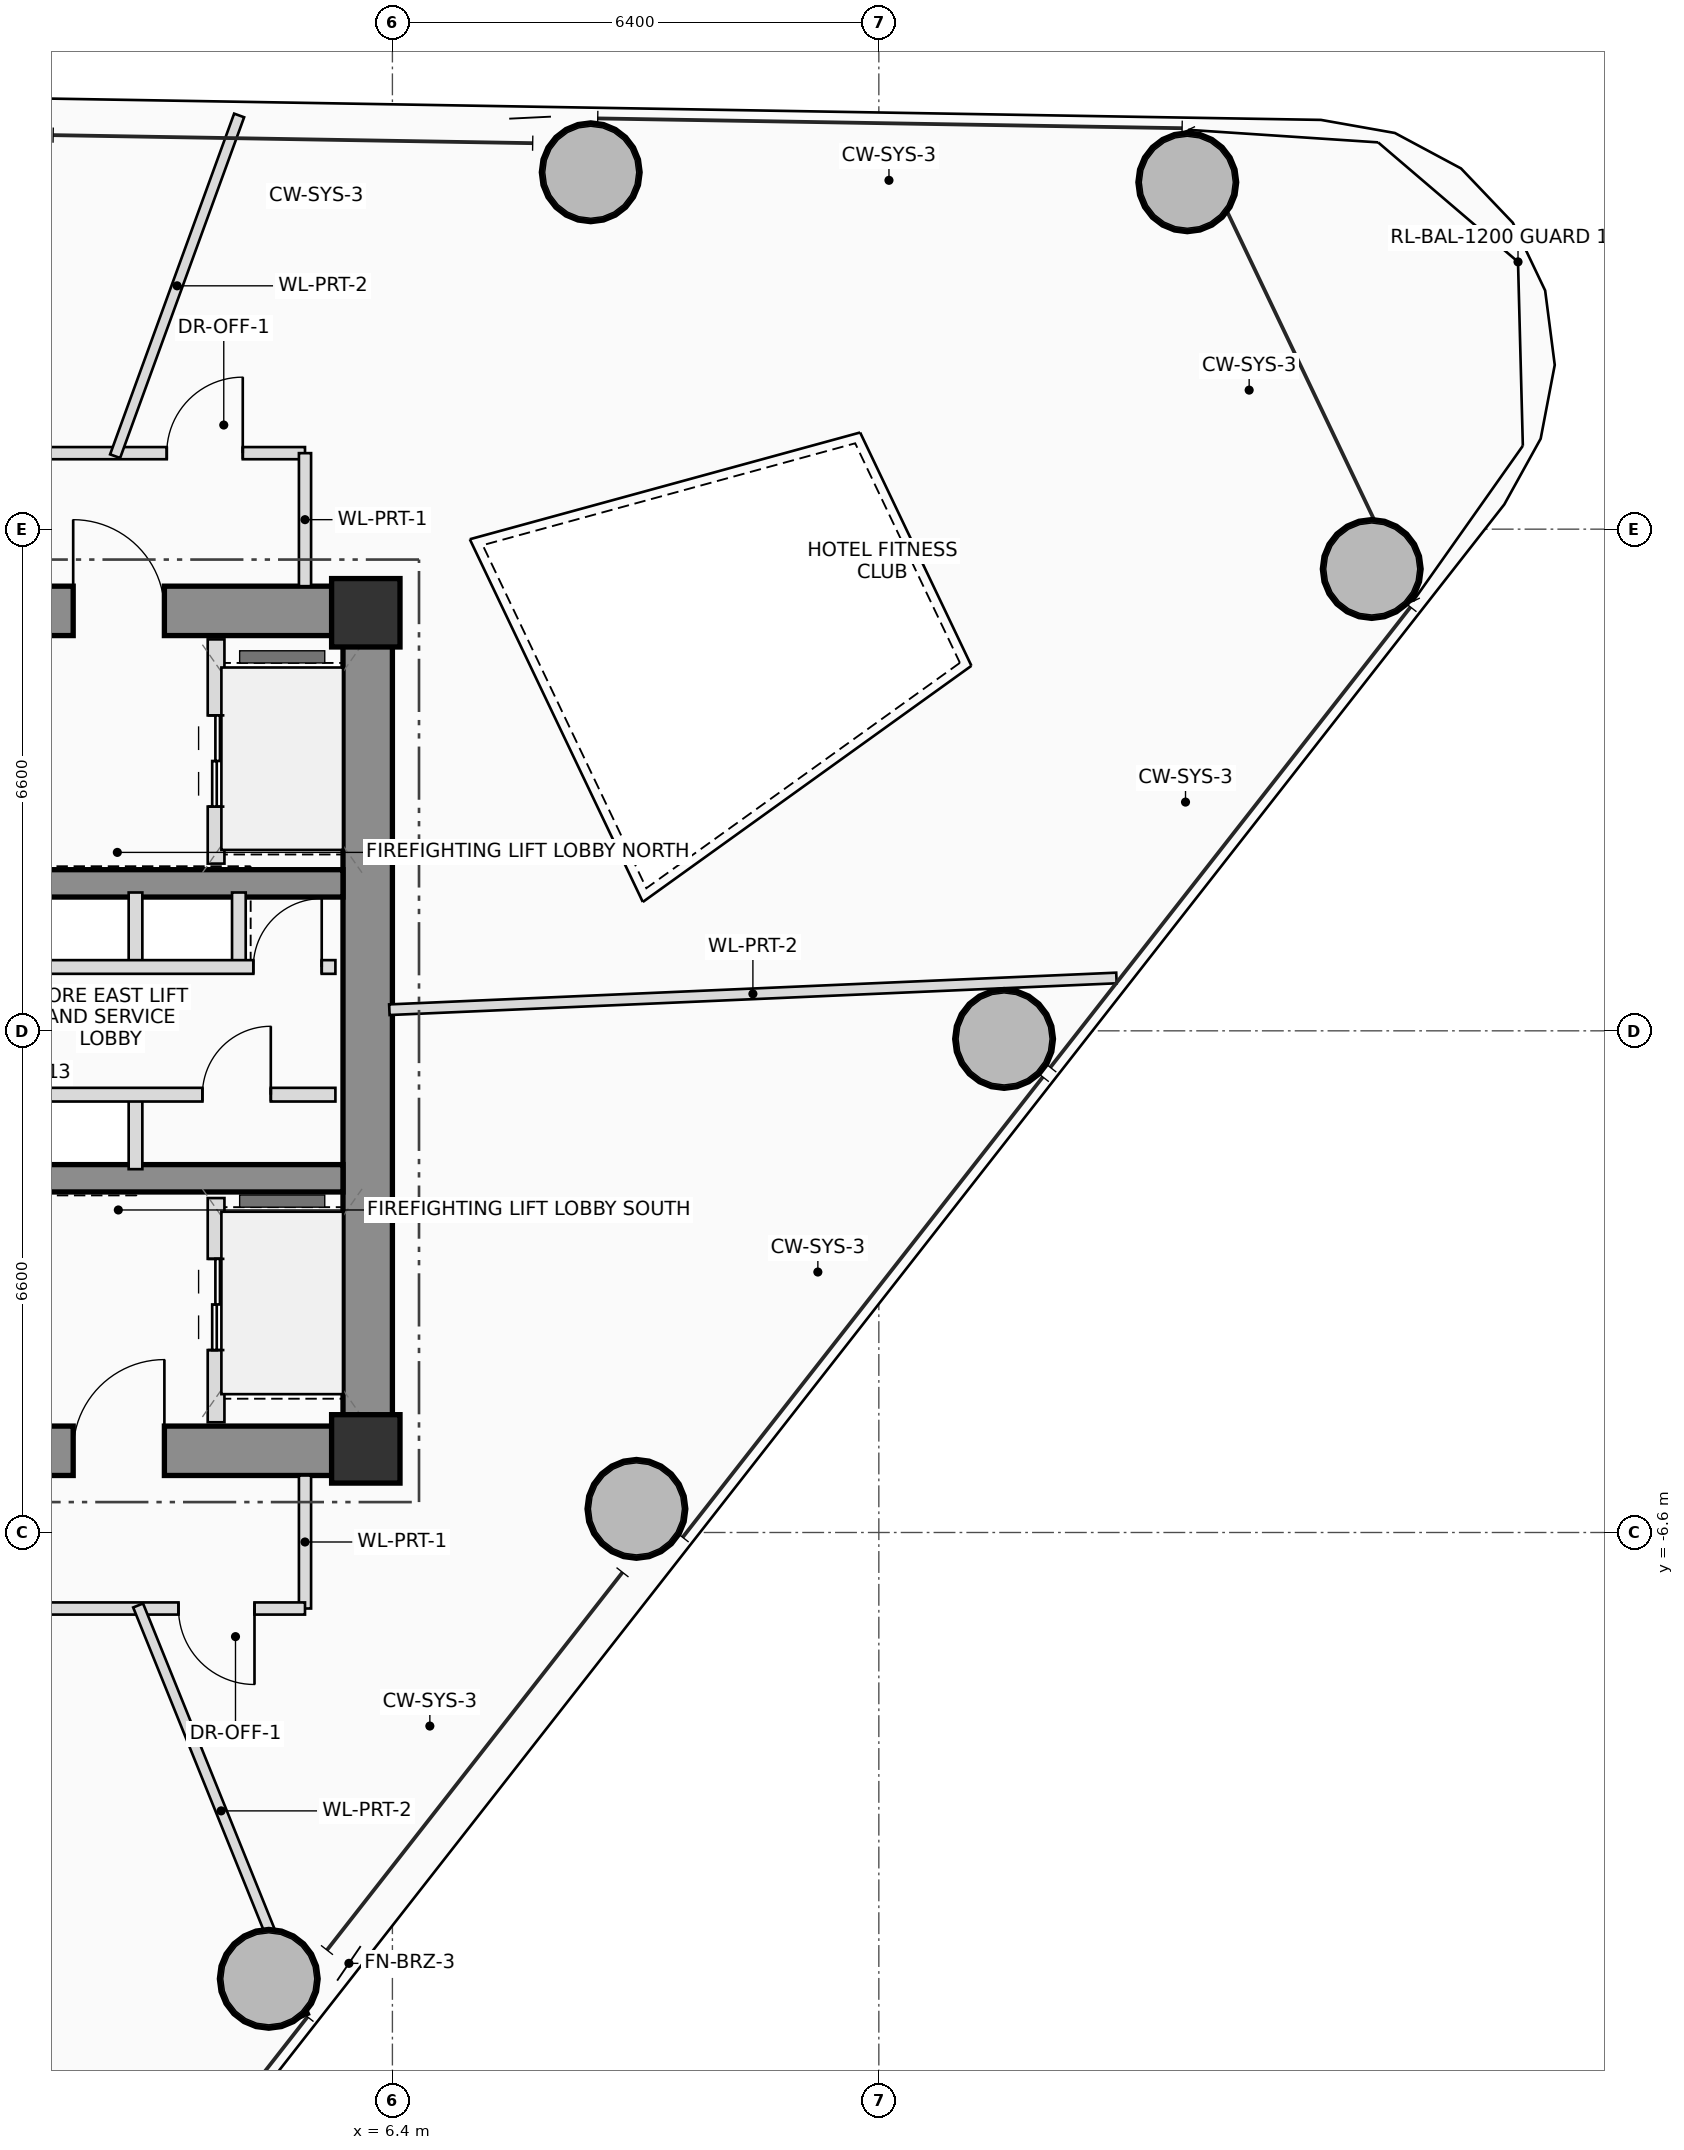
"""IFC4 building model, lengths in metres.
Left out: names, types, materials, properties, quantities, classifications, styles, units other than length and angle.
Written with IfcOpenShell. Run it as: python <this file> out.ifc"""

import sys

from ifc_helpers import new_model, si_unit, direction, frame, frame_2d, origin, origin_2d, place, context, subcontext, project, spatial, rectangle, hollow_circle, extrude, source, transform, mapped, element, fill, save


model = new_model("IFC4")
c1 = context("Model", 3, precision=1e-05, world=origin(), true_north=direction((0.0, 1.0)))
c2 = subcontext(c1, "Body", "Model", "MODEL_VIEW")
j1 = project(units=[si_unit("LENGTHUNIT", "METRE"), si_unit("PLANEANGLEUNIT", "RADIAN")], contexts=[c1])
p1 = place(None, origin())
s1 = spatial("IfcSite", under=j1, at=p1, CompositionType="ELEMENT")
p2 = place(p1, origin())
s2 = spatial("IfcBuilding", under=s1, at=p2, CompositionType="ELEMENT")
p3 = place(p2, frame((0.0, 0.0, 139.85)))
s3 = spatial("IfcBuildingStorey", under=s2, at=p3, CompositionType="ELEMENT", Elevation=139.85)
m1 = source(origin(), c2, "Body", "SweptSolid", [
    extrude(rectangle(XDim=0.9, YDim=0.9, at=origin_2d()), origin(), (0.0, 0.0, 1.0), 3.45),
])
for number, where, z_axis, x_axis in (
    (1, (6.05, -5.5, 0.0), (0.0, 0.0, 1.0), (1.0, 0.0, 0.0)),
    (2, (6.05, 5.5, 0.0), (0.0, 0.0, 1.0), (1.0, 0.0, 0.0)),
):
    element("IfcColumn", number, at=place(p3, frame(where, z_axis=z_axis, x_axis=x_axis)), inside=s3, PredefinedType="COLUMN", context=c2, shape_type="MappedRepresentation", body=[
        mapped(m1, transform((0.0, 0.0, 0.0), scale=1.0)),
    ])
p4 = place(p3, frame((-6.4, 5.525, 0.0), z_axis=(0.0, 0.0, 1.0), x_axis=(1.0, 0.0, 0.0)))
e3 = element("IfcWall", 3, at=p4, inside=s3, PredefinedType="SHEAR", context=c2, shape_type="SweptSolid", body=[
    extrude(rectangle(XDim=12.8, YDim=0.65, at=frame_2d((6.4, 0.0))), origin(), (0.0, 0.0, 1.0), 3.45),
])
p5 = place(p4, frame((8.6, 0.0, 0.0)))
e4 = element("IfcOpeningElement", 4, at=p5, cuts=e3, PredefinedType="OPENING", context=c2, shape_type="SweptSolid", body=[
    extrude(rectangle(XDim=1.2, YDim=2.2, at=frame_2d((0.6, 1.1))), frame((0.0, 0.335, 0.0), z_axis=(0.0, -1.0, 0.0), x_axis=(1.0, 0.0, 0.0)), (0.0, 0.0, 1.0), 0.67),
])
p6 = place(p3, frame((-6.4, -5.525, 0.0), z_axis=(0.0, 0.0, 1.0), x_axis=(1.0, 0.0, 0.0)))
e5 = element("IfcWall", 5, at=p6, inside=s3, PredefinedType="SHEAR", context=c2, shape_type="SweptSolid", body=[
    extrude(rectangle(XDim=12.8, YDim=0.65, at=frame_2d((6.4, 0.0))), origin(), (0.0, 0.0, 1.0), 3.45),
])
p7 = place(p6, frame((8.6, 0.0, 0.0)))
e6 = element("IfcOpeningElement", 6, at=p7, cuts=e5, PredefinedType="OPENING", context=c2, shape_type="SweptSolid", body=[
    extrude(rectangle(XDim=1.2, YDim=2.2, at=frame_2d((0.6, 1.1))), frame((0.0, 0.335, 0.0), z_axis=(0.0, -1.0, 0.0), x_axis=(1.0, 0.0, 0.0)), (0.0, 0.0, 1.0), 0.67),
])
p8 = place(p3, frame((6.075, -5.2, 0.0), z_axis=(0.0, 0.0, 1.0), x_axis=(0.0, 1.0, 0.0)))
e7 = element("IfcWall", 7, at=p8, inside=s3, PredefinedType="SHEAR", context=c2, shape_type="SweptSolid", body=[
    extrude(rectangle(XDim=10.4, YDim=0.65, at=frame_2d((5.2, 0.0))), origin(), (0.0, 0.0, 1.0), 3.45),
])
for number, where, z_axis, x_axis in (
    (8, (-5.75, 1.94, 0.0), (0.0, 0.0, 1.0), (1.0, 0.0, 0.0)),
    (9, (-5.75, -1.94, 0.0), (0.0, 0.0, 1.0), (1.0, 0.0, 0.0)),
):
    element("IfcWall", number, at=place(p3, frame(where, z_axis=z_axis, x_axis=x_axis)), inside=s3, PredefinedType="SHEAR", context=c2, shape_type="SweptSolid", body=[
        extrude(rectangle(XDim=11.5, YDim=0.36, at=frame_2d((5.75, 0.0))), origin(), (0.0, 0.0, 1.0), 3.45),
    ])
m2 = source(origin(), c2, "Body", "SweptSolid", [
    extrude(hollow_circle(Radius=0.65, WallThickness=0.045, at=origin_2d()), origin(), (0.0, 0.0, 1.0), 3.45),
])
for number, where, z_axis, x_axis in (
    (10, (4.773, -12.472, 0.0), (0.0, 0.0, 1.0), (1.0, 0.0, 0.0)),
    (11, (9.611, -6.289, 0.0), (0.0, 0.0, 1.0), (1.0, 0.0, 0.0)),
    (12, (14.448, -0.107, 0.0), (0.0, 0.0, 1.0), (1.0, 0.0, 0.0)),
    (13, (19.285, 6.076, 0.0), (0.0, 0.0, 1.0), (1.0, 0.0, 0.0)),
    (14, (16.858, 11.164, 0.0), (0.0, 0.0, 1.0), (1.0, 0.0, 0.0)),
    (15, (9.01, 11.295, 0.0), (0.0, 0.0, 1.0), (1.0, 0.0, 0.0)),
):
    element("IfcColumn", number, at=place(p3, frame(where, z_axis=z_axis, x_axis=x_axis)), inside=s3, PredefinedType="COLUMN", context=c2, shape_type="MappedRepresentation", body=[
        mapped(m2, transform((0.0, 0.0, 0.0), scale=1.0)),
    ])
p9 = place(p3, frame((4.08, 2.2, 0.0), z_axis=(0.0, 0.0, 1.0), x_axis=(0.0, 1.0, 0.0)))
e16 = element("IfcWall", 16, at=p9, inside=s3, PredefinedType="PLUMBINGWALL", context=c2, shape_type="SweptSolid", body=[
    extrude(rectangle(XDim=2.95, YDim=0.22, at=frame_2d((1.475, 0.0))), origin(), (0.0, 0.0, 1.0), 3.25),
])
p10 = place(p9, frame((0.75, 0.0, 0.0)))
e17 = element("IfcOpeningElement", 17, at=p10, cuts=e16, PredefinedType="OPENING", context=c2, shape_type="SweptSolid", body=[
    extrude(rectangle(XDim=1.2, YDim=2.25, at=frame_2d((0.6, 1.125))), frame((0.0, 0.12, 0.0), z_axis=(0.0, -1.0, 0.0), x_axis=(1.0, 0.0, 0.0)), (0.0, 0.0, 1.0), 0.24),
])
p11 = place(p3, frame((4.08, -5.15, 0.0), z_axis=(0.0, 0.0, 1.0), x_axis=(0.0, 1.0, 0.0)))
e18 = element("IfcWall", 18, at=p11, inside=s3, PredefinedType="PLUMBINGWALL", context=c2, shape_type="SweptSolid", body=[
    extrude(rectangle(XDim=2.95, YDim=0.22, at=frame_2d((1.475, 0.0))), origin(), (0.0, 0.0, 1.0), 3.25),
])
p12 = place(p11, frame((0.95, 0.0, 0.0)))
e19 = element("IfcOpeningElement", 19, at=p12, cuts=e18, PredefinedType="OPENING", context=c2, shape_type="SweptSolid", body=[
    extrude(rectangle(XDim=1.2, YDim=2.25, at=frame_2d((0.6, 1.125))), frame((0.0, 0.12, 0.0), z_axis=(0.0, -1.0, 0.0), x_axis=(1.0, 0.0, 0.0)), (0.0, 0.0, 1.0), 0.24),
])
for number, where, z_axis, x_axis in (
    (20, (3.02, 0.84, 0.0), (0.0, 0.0, 1.0), (0.0, 1.0, 0.0)),
    (21, (4.38, 0.84, 0.0), (0.0, 0.0, 1.0), (0.0, 1.0, 0.0)),
    (22, (3.02, -1.82, 0.0), (0.0, 0.0, 1.0), (0.0, 1.0, 0.0)),
):
    element("IfcWall", number, at=place(p3, frame(where, z_axis=z_axis, x_axis=x_axis)), inside=s3, PredefinedType="PLUMBINGWALL", context=c2, shape_type="SweptSolid", body=[
        extrude(rectangle(XDim=0.98, YDim=0.18, at=frame_2d((0.49, 0.0))), origin(), (0.0, 0.0, 1.0), 3.25),
    ])
p13 = place(p3, frame((-5.68, 0.84, 0.0), z_axis=(0.0, 0.0, 1.0), x_axis=(1.0, 0.0, 0.0)))
e23 = element("IfcWall", 23, at=p13, inside=s3, PredefinedType="PLUMBINGWALL", context=c2, shape_type="SweptSolid", body=[
    extrude(rectangle(XDim=11.33, YDim=0.18, at=frame_2d((5.665, 0.0))), origin(), (0.0, 0.0, 1.0), 3.25),
])
p14 = place(p13, frame((1.03, 0.0, 0.0)))
e24 = element("IfcOpeningElement", 24, at=p14, cuts=e23, PredefinedType="OPENING", context=c2, shape_type="SweptSolid", body=[
    extrude(rectangle(XDim=0.9, YDim=2.05, at=frame_2d((0.45, 1.025))), frame((0.0, 0.1, 0.0), z_axis=(0.0, -1.0, 0.0), x_axis=(1.0, 0.0, 0.0)), (0.0, 0.0, 1.0), 0.2),
])
p15 = place(p13, frame((3.93, 0.0, 0.0)))
e25 = element("IfcOpeningElement", 25, at=p15, cuts=e23, PredefinedType="OPENING", context=c2, shape_type="SweptSolid", body=[
    extrude(rectangle(XDim=1.1, YDim=2.2, at=frame_2d((0.55, 1.1))), frame((0.0, 0.1, 0.0), z_axis=(0.0, -1.0, 0.0), x_axis=(1.0, 0.0, 0.0)), (0.0, 0.0, 1.0), 0.2),
])
p16 = place(p13, frame((5.63, 0.0, 0.0)))
e26 = element("IfcOpeningElement", 26, at=p16, cuts=e23, PredefinedType="OPENING", context=c2, shape_type="SweptSolid", body=[
    extrude(rectangle(XDim=1.1, YDim=2.2, at=frame_2d((0.55, 1.1))), frame((0.0, 0.1, 0.0), z_axis=(0.0, -1.0, 0.0), x_axis=(1.0, 0.0, 0.0)), (0.0, 0.0, 1.0), 0.2),
])
p17 = place(p13, frame((10.25, 0.0, 0.0)))
e27 = element("IfcOpeningElement", 27, at=p17, cuts=e23, PredefinedType="OPENING", context=c2, shape_type="SweptSolid", body=[
    extrude(rectangle(XDim=0.9, YDim=2.05, at=frame_2d((0.45, 1.025))), frame((0.0, 0.1, 0.0), z_axis=(0.0, -1.0, 0.0), x_axis=(1.0, 0.0, 0.0)), (0.0, 0.0, 1.0), 0.2),
])
p18 = place(p3, frame((-5.68, -0.84, 0.0), z_axis=(0.0, 0.0, 1.0), x_axis=(1.0, 0.0, 0.0)))
e28 = element("IfcWall", 28, at=p18, inside=s3, PredefinedType="PLUMBINGWALL", context=c2, shape_type="SweptSolid", body=[
    extrude(rectangle(XDim=11.33, YDim=0.18, at=frame_2d((5.665, 0.0))), origin(), (0.0, 0.0, 1.0), 3.25),
])
p19 = place(p18, frame((1.73, 0.0, 0.0)))
e29 = element("IfcOpeningElement", 29, at=p19, cuts=e28, PredefinedType="OPENING", context=c2, shape_type="SweptSolid", body=[
    extrude(rectangle(XDim=0.9, YDim=2.05, at=frame_2d((0.45, 1.025))), frame((0.0, 0.1, 0.0), z_axis=(0.0, -1.0, 0.0), x_axis=(1.0, 0.0, 0.0)), (0.0, 0.0, 1.0), 0.2),
])
p20 = place(p18, frame((3.93, 0.0, 0.0)))
e30 = element("IfcOpeningElement", 30, at=p20, cuts=e28, PredefinedType="OPENING", context=c2, shape_type="SweptSolid", body=[
    extrude(rectangle(XDim=1.1, YDim=2.2, at=frame_2d((0.55, 1.1))), frame((0.0, 0.1, 0.0), z_axis=(0.0, -1.0, 0.0), x_axis=(1.0, 0.0, 0.0)), (0.0, 0.0, 1.0), 0.2),
])
p21 = place(p18, frame((5.63, 0.0, 0.0)))
e31 = element("IfcOpeningElement", 31, at=p21, cuts=e28, PredefinedType="OPENING", context=c2, shape_type="SweptSolid", body=[
    extrude(rectangle(XDim=1.1, YDim=2.2, at=frame_2d((0.55, 1.1))), frame((0.0, 0.1, 0.0), z_axis=(0.0, -1.0, 0.0), x_axis=(1.0, 0.0, 0.0)), (0.0, 0.0, 1.0), 0.2),
])
p22 = place(p18, frame((9.58, 0.0, 0.0)))
e32 = element("IfcOpeningElement", 32, at=p22, cuts=e28, PredefinedType="OPENING", context=c2, shape_type="SweptSolid", body=[
    extrude(rectangle(XDim=0.9, YDim=2.05, at=frame_2d((0.45, 1.025))), frame((0.0, 0.1, 0.0), z_axis=(0.0, -1.0, 0.0), x_axis=(1.0, 0.0, 0.0)), (0.0, 0.0, 1.0), 0.2),
])
p23 = place(p3, frame((-6.36, 7.6, 0.0), z_axis=(0.0, 0.0, 1.0), x_axis=(1.0, 0.0, 0.0)))
e33 = element("IfcWall", 33, at=p23, inside=s3, PredefinedType="PARTITIONING", context=c2, shape_type="SweptSolid", body=[
    extrude(rectangle(XDim=11.61, YDim=0.16, at=frame_2d((5.805, 0.0))), origin(), (0.0, 0.0, 1.0), 2.605),
])
p24 = place(p23, frame((4.501, 0.0, 0.0)))
e34 = element("IfcOpeningElement", 34, at=p24, cuts=e33, PredefinedType="OPENING", context=c2, shape_type="SweptSolid", body=[
    extrude(rectangle(XDim=1.05, YDim=2.2, at=frame_2d((0.525, 1.1))), frame((0.0, 0.09, 0.0), z_axis=(0.0, -1.0, 0.0), x_axis=(1.0, 0.0, 0.0)), (0.0, 0.0, 1.0), 0.18),
])
p25 = place(p23, frame((9.791, 0.0, 0.0)))
e35 = element("IfcOpeningElement", 35, at=p25, cuts=e33, PredefinedType="OPENING", context=c2, shape_type="SweptSolid", body=[
    extrude(rectangle(XDim=1.0, YDim=2.25, at=frame_2d((0.5, 1.125))), frame((0.0, 0.09, 0.0), z_axis=(0.0, -1.0, 0.0), x_axis=(1.0, 0.0, 0.0)), (0.0, 0.0, 1.0), 0.18),
])
p26 = place(p3, frame((5.25, 7.6, 0.0), z_axis=(0.0, 0.0, 1.0), x_axis=(0.0, -1.0, 0.0)))
e36 = element("IfcWall", 36, at=p26, inside=s3, PredefinedType="PARTITIONING", context=c2, shape_type="SweptSolid", body=[
    extrude(rectangle(XDim=1.75, YDim=0.16, at=frame_2d((0.875, 0.0))), origin(), (0.0, 0.0, 1.0), 2.605),
])
p27 = place(p3, frame((5.25, -5.85, 0.0), z_axis=(0.0, 0.0, 1.0), x_axis=(0.0, -1.0, 0.0)))
e37 = element("IfcWall", 37, at=p27, inside=s3, PredefinedType="PARTITIONING", context=c2, shape_type="SweptSolid", body=[
    extrude(rectangle(XDim=1.75, YDim=0.16, at=frame_2d((0.875, 0.0))), origin(), (0.0, 0.0, 1.0), 3.25),
])
p28 = place(p3, frame((5.25, -7.6, 0.0), z_axis=(0.0, 0.0, 1.0), x_axis=(-1.0, 0.0, 0.0)))
e38 = element("IfcWall", 38, at=p28, inside=s3, PredefinedType="PARTITIONING", context=c2, shape_type="SweptSolid", body=[
    extrude(rectangle(XDim=11.61, YDim=0.16, at=frame_2d((5.805, 0.0))), origin(), (0.0, 0.0, 1.0), 2.605),
])
p29 = place(p28, frame((0.665, 0.0, 0.0)))
e39 = element("IfcOpeningElement", 39, at=p29, cuts=e38, PredefinedType="OPENING", context=c2, shape_type="SweptSolid", body=[
    extrude(rectangle(XDim=1.0, YDim=2.25, at=frame_2d((0.5, 1.125))), frame((0.0, 0.09, 0.0), z_axis=(0.0, -1.0, 0.0), x_axis=(1.0, 0.0, 0.0)), (0.0, 0.0, 1.0), 0.18),
])
p30 = place(p28, frame((5.363, 0.0, 0.0)))
e40 = element("IfcOpeningElement", 40, at=p30, cuts=e38, PredefinedType="OPENING", context=c2, shape_type="SweptSolid", body=[
    extrude(rectangle(XDim=1.0, YDim=2.25, at=frame_2d((0.5, 1.125))), frame((0.0, 0.09, 0.0), z_axis=(0.0, -1.0, 0.0), x_axis=(1.0, 0.0, 0.0)), (0.0, 0.0, 1.0), 0.18),
])
p31 = place(p3, frame((6.36, 0.278, 0.0), z_axis=(0.0, 0.0, 1.0), x_axis=(0.999047913846, 0.043626435113, 0.0)))
e41 = element("IfcWall", 41, at=p31, inside=s3, PredefinedType="PARTITIONING", context=c2, shape_type="SweptSolid", body=[
    extrude(rectangle(XDim=9.575, YDim=0.14, at=frame_2d((4.788, 0.0))), origin(), (0.0, 0.0, 1.0), 2.605),
])
p32 = place(p3, frame((2.752, 7.56, 0.0), z_axis=(0.0, 0.0, 1.0), x_axis=(0.342010136434, 0.939696262936, 0.0)))
e42 = element("IfcWall", 42, at=p32, inside=s3, PredefinedType="PARTITIONING", context=c2, shape_type="SweptSolid", body=[
    extrude(rectangle(XDim=4.771, YDim=0.14, at=frame_2d((2.385, 0.0))), origin(), (0.0, 0.0, 1.0), 2.605),
])
p33 = place(p3, frame((3.054, -7.56, 0.0), z_axis=(0.0, 0.0, 1.0), x_axis=(0.374616076071, -0.927180023269, 0.0)))
e43 = element("IfcWall", 43, at=p33, inside=s3, PredefinedType="PARTITIONING", context=c2, shape_type="SweptSolid", body=[
    extrude(rectangle(XDim=5.83, YDim=0.14, at=frame_2d((2.915, 0.0))), origin(), (0.0, 0.0, 1.0), 2.605),
])
p34 = place(p5, origin())
e44 = element("IfcDoor", 44, at=p34, inside=s3, OperationType="SINGLE_SWING_LEFT", PredefinedType="DOOR", context=c2, shape_type="SweptSolid", body=[
    extrude(rectangle(XDim=1.2, YDim=2.2, at=frame_2d((0.6, 1.1))), frame((0.0, 0.025, 0.0), z_axis=(0.0, -1.0, 0.0), x_axis=(1.0, 0.0, 0.0)), (0.0, 0.0, 1.0), 0.05),
])
fill(e4, e44)
p35 = place(p7, origin())
e45 = element("IfcDoor", 45, at=p35, inside=s3, OperationType="SINGLE_SWING_RIGHT", PredefinedType="DOOR", context=c2, shape_type="SweptSolid", body=[
    extrude(rectangle(XDim=1.2, YDim=2.2, at=frame_2d((0.6, 1.1))), frame((0.0, 0.025, 0.0), z_axis=(0.0, -1.0, 0.0), x_axis=(1.0, 0.0, 0.0)), (0.0, 0.0, 1.0), 0.05),
])
fill(e6, e45)
p36 = place(p10, origin())
e46 = element("IfcDoor", 46, at=p36, inside=s3, OperationType="DOUBLE_DOOR_SLIDING", PredefinedType="DOOR", context=c2, shape_type="SweptSolid", body=[
    extrude(rectangle(XDim=1.2, YDim=2.25, at=frame_2d((0.6, 1.125))), frame((0.0, 0.025, 0.0), z_axis=(0.0, -1.0, 0.0), x_axis=(1.0, 0.0, 0.0)), (0.0, 0.0, 1.0), 0.05),
])
fill(e17, e46)
p37 = place(p12, origin())
e47 = element("IfcDoor", 47, at=p37, inside=s3, OperationType="DOUBLE_DOOR_SLIDING", PredefinedType="DOOR", context=c2, shape_type="SweptSolid", body=[
    extrude(rectangle(XDim=1.2, YDim=2.25, at=frame_2d((0.6, 1.125))), frame((0.0, 0.025, 0.0), z_axis=(0.0, -1.0, 0.0), x_axis=(1.0, 0.0, 0.0)), (0.0, 0.0, 1.0), 0.05),
])
fill(e19, e47)
p38 = place(p17, origin())
e48 = element("IfcDoor", 48, at=p38, inside=s3, OperationType="SINGLE_SWING_RIGHT", PredefinedType="DOOR", context=c2, shape_type="SweptSolid", body=[
    extrude(rectangle(XDim=0.9, YDim=2.05, at=frame_2d((0.45, 1.025))), frame((0.0, 0.025, 0.0), z_axis=(0.0, -1.0, 0.0), x_axis=(1.0, 0.0, 0.0)), (0.0, 0.0, 1.0), 0.05),
])
fill(e27, e48)
p39 = place(p22, origin())
e49 = element("IfcDoor", 49, at=p39, inside=s3, OperationType="SINGLE_SWING_RIGHT", PredefinedType="DOOR", context=c2, shape_type="SweptSolid", body=[
    extrude(rectangle(XDim=0.9, YDim=2.05, at=frame_2d((0.45, 1.025))), frame((0.0, 0.025, 0.0), z_axis=(0.0, -1.0, 0.0), x_axis=(1.0, 0.0, 0.0)), (0.0, 0.0, 1.0), 0.05),
])
fill(e32, e49)
p40 = place(p25, origin())
e50 = element("IfcDoor", 50, at=p40, inside=s3, OperationType="SINGLE_SWING_RIGHT", PredefinedType="DOOR", context=c2, shape_type="SweptSolid", body=[
    extrude(rectangle(XDim=1.0, YDim=2.25, at=frame_2d((0.5, 1.125))), frame((0.0, 0.025, 0.0), z_axis=(0.0, -1.0, 0.0), x_axis=(1.0, 0.0, 0.0)), (0.0, 0.0, 1.0), 0.05),
])
fill(e35, e50)
p41 = place(p29, origin())
e51 = element("IfcDoor", 51, at=p41, inside=s3, OperationType="SINGLE_SWING_LEFT", PredefinedType="DOOR", context=c2, shape_type="SweptSolid", body=[
    extrude(rectangle(XDim=1.0, YDim=2.25, at=frame_2d((0.5, 1.125))), frame((0.0, 0.025, 0.0), z_axis=(0.0, -1.0, 0.0), x_axis=(1.0, 0.0, 0.0)), (0.0, 0.0, 1.0), 0.05),
])
fill(e39, e51)
save(model, sys.argv[1])
